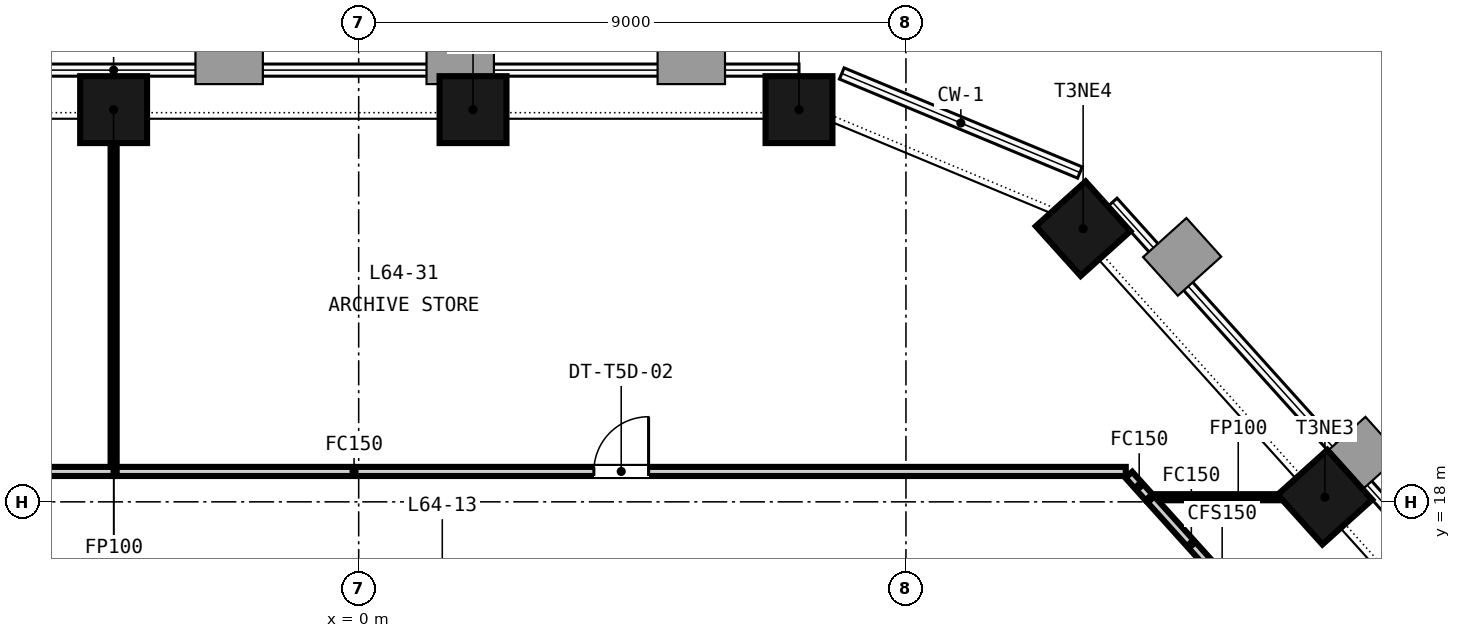
"""IFC4 building model, lengths in metres.
Left out: names, types, materials, properties, quantities, classifications, styles, units other than length and angle.
Written with IfcOpenShell. Run it as: python <this file> out.ifc"""

import sys

from ifc_helpers import new_model, si_unit, direction, frame, frame_2d, origin, origin_2d, place, context, subcontext, project, spatial, rectangle, extrude, element, fill, save


model = new_model("IFC4")
c1 = context("Model", 3, precision=1e-05, world=origin(), true_north=direction((0.0, 1.0)))
c2 = subcontext(c1, "Body", "Model", "MODEL_VIEW")
j1 = project(units=[si_unit("LENGTHUNIT", "METRE"), si_unit("PLANEANGLEUNIT", "RADIAN")], contexts=[c1])
p1 = place(None, origin())
s1 = spatial("IfcSite", under=j1, at=p1, CompositionType="ELEMENT")
p2 = place(p1, origin())
s2 = spatial("IfcBuilding", under=s1, at=p2, CompositionType="ELEMENT")
p3 = place(p2, frame((0.0, 0.0, 252.8)))
s3 = spatial("IfcBuildingStorey", under=s2, at=p3, CompositionType="ELEMENT", Elevation=252.8)
for number, where, z_axis, x_axis in (
    (1, (7.241, 24.45, -0.15), (0.0, 0.0, 1.0), (-1.0, 0.0, 0.0)),
    (2, (1.881, 24.45, -0.15), (0.0, 0.0, 1.0), (-1.0, 0.0, 0.0)),
    (3, (-4.03, 24.45, -0.15), (0.0, 0.0, 1.0), (-1.0, 0.0, 0.0)),
    (4, (15.89, 18.076, -0.15), (0.0, 0.0, 1.0), (-0.669, 0.743, 0.0)),
    (5, (11.914, 22.492, -0.15), (0.0, 0.0, 1.0), (-0.669, 0.743, 0.0)),
):
    element("IfcColumn", number, at=place(p3, frame(where, z_axis=z_axis, x_axis=x_axis)), inside=s3, PredefinedType="COLUMN", context=c2, shape_type="SweptSolid", body=[
        extrude(rectangle(XDim=1.1, YDim=1.1, at=origin_2d()), origin(), (0.0, 0.0, 1.0), 3.5),
    ])
p4 = place(p3, frame((-14.925, 18.5, 0.0), z_axis=(0.0, 0.0, 1.0), x_axis=(1.0, 0.0, 0.0)))
e6 = element("IfcWall", 6, at=p4, inside=s3, PredefinedType="PARTITIONING", context=c2, shape_type="SweptSolid", body=[
    extrude(rectangle(XDim=10.895, YDim=0.15, at=frame_2d((5.448, 0.0))), origin(), (0.0, 0.0, 1.0), 2.601),
])
p5 = place(p4, frame((4.948, 0.0, 0.0)))
e7 = element("IfcOpeningElement", 7, at=p5, cuts=e6, PredefinedType="OPENING", context=c2, shape_type="SweptSolid", body=[
    extrude(rectangle(XDim=1.0, YDim=2.1, at=frame_2d((0.5, 1.05))), frame((0.0, 0.085, 0.0), z_axis=(0.0, -1.0, 0.0), x_axis=(1.0, 0.0, 0.0)), (0.0, 0.0, 1.0), 0.17),
])
p6 = place(p3, frame((-4.03, 18.575, 0.0), z_axis=(0.0, 0.0, 1.0), x_axis=(0.0, 1.0, 0.0)))
e8 = element("IfcWall", 8, at=p6, inside=s3, PredefinedType="PARTITIONING", context=c2, shape_type="SweptSolid", body=[
    extrude(rectangle(XDim=5.825, YDim=0.1, at=frame_2d((2.913, 0.0))), origin(), (0.0, 0.0, 1.0), 2.601),
])
p7 = place(p3, frame((-3.98, 18.5, 0.0), z_axis=(0.0, 0.0, 1.0), x_axis=(1.0, 0.0, 0.0)))
e9 = element("IfcWall", 9, at=p7, inside=s3, PredefinedType="PARTITIONING", context=c2, shape_type="SweptSolid", body=[
    extrude(rectangle(XDim=16.595, YDim=0.15, at=frame_2d((8.297, 0.0))), origin(), (0.0, 0.0, 1.0), 2.601),
])
p8 = place(p7, frame((7.847, 0.0, 0.0)))
e10 = element("IfcOpeningElement", 10, at=p8, cuts=e9, PredefinedType="OPENING", context=c2, shape_type="SweptSolid", body=[
    extrude(rectangle(XDim=0.9, YDim=2.1, at=frame_2d((0.45, 1.05))), frame((0.0, 0.085, 0.0), z_axis=(0.0, -1.0, 0.0), x_axis=(1.0, 0.0, 0.0)), (0.0, 0.0, 1.0), 0.17),
])
p9 = place(p3, frame((12.665, 18.444, 0.0), z_axis=(0.0, 0.0, 1.0), x_axis=(0.668637752652, -0.743588297197, 0.0)))
e11 = element("IfcWall", 11, at=p9, inside=s3, PredefinedType="PARTITIONING", context=c2, shape_type="SweptSolid", body=[
    extrude(rectangle(XDim=0.495, YDim=0.15, at=frame_2d((0.248, 0.0))), origin(), (0.0, 0.0, 1.0), 2.601),
])
p10 = place(p3, frame((13.097, 18.076, 0.0), z_axis=(0.0, 0.0, 1.0), x_axis=(1.0, 0.0, 0.0)))
e12 = element("IfcWall", 12, at=p10, inside=s3, PredefinedType="PARTITIONING", context=c2, shape_type="SweptSolid", body=[
    extrude(rectangle(XDim=2.725, YDim=0.1, at=frame_2d((1.363, 0.0))), origin(), (0.0, 0.0, 1.0), 2.601),
])
p11 = place(p3, frame((13.03, 18.039, 0.0), z_axis=(0.0, 0.0, 1.0), x_axis=(0.669183955235, -0.743096786466, 0.0)))
e13 = element("IfcWall", 13, at=p11, inside=s3, PredefinedType="PARTITIONING", context=c2, shape_type="SweptSolid", body=[
    extrude(rectangle(XDim=1.969, YDim=0.15, at=frame_2d((0.984, 0.0))), origin(), (0.0, 0.0, 1.0), 2.601),
])
p12 = place(p8, origin())
e14 = element("IfcDoor", 14, at=p12, inside=s3, OperationType="SINGLE_SWING_RIGHT", PredefinedType="DOOR", context=c2, shape_type="SweptSolid", body=[
    extrude(rectangle(XDim=0.9, YDim=2.1, at=frame_2d((0.45, 1.05))), frame((0.0, 0.025, 0.0), z_axis=(0.0, -1.0, 0.0), x_axis=(1.0, 0.0, 0.0)), (0.0, 0.0, 1.0), 0.05),
])
fill(e10, e14)
save(model, sys.argv[1])
